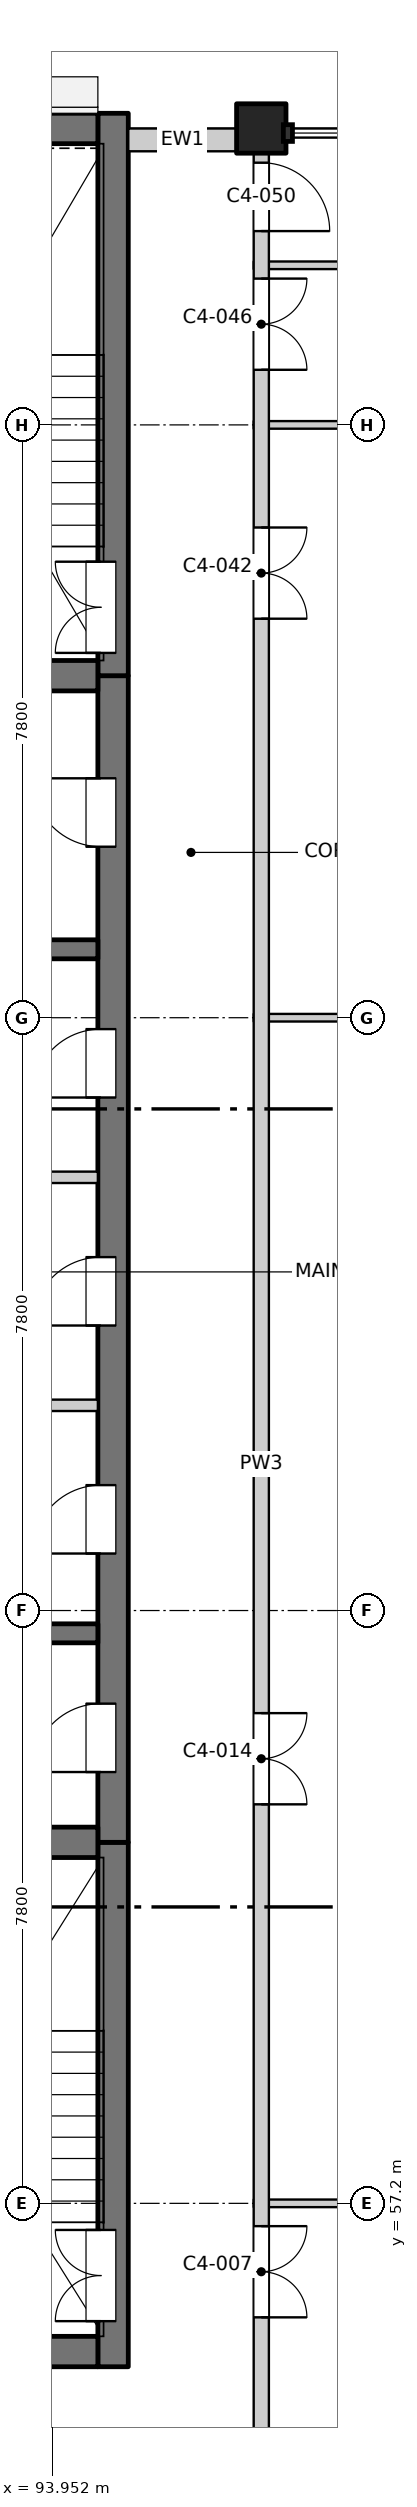
"""IFC4 building model, lengths in metres.
Left out: names, types, materials, properties, quantities, classifications, styles, units other than length and angle.
Written with IfcOpenShell. Run it as: python <this file> out.ifc"""

import sys

from ifc_helpers import new_model, si_unit, direction, frame, frame_2d, origin, origin_2d, place, context, subcontext, project, spatial, rectangle, extrude, element, fill, save


model = new_model("IFC4")
c1 = context("Model", 3, precision=1e-05, world=origin(), true_north=direction((0.0, 1.0)))
c2 = subcontext(c1, "Body", "Model", "MODEL_VIEW")
j1 = project(units=[si_unit("LENGTHUNIT", "METRE"), si_unit("PLANEANGLEUNIT", "RADIAN")], contexts=[c1])
p1 = place(None, origin())
s1 = spatial("IfcSite", under=j1, at=p1, CompositionType="ELEMENT")
p2 = place(p1, origin())
s2 = spatial("IfcBuilding", under=s1, at=p2, CompositionType="ELEMENT")
p3 = place(p2, frame((0.0, 0.0, 256.2)))
s3 = spatial("IfcBuildingStorey", under=s2, at=p3, CompositionType="ELEMENT", Elevation=256.2)
p4 = place(p3, frame((96.7, 84.5, -0.25), z_axis=(0.0, 0.0, 1.0), x_axis=(1.0, 0.0, 0.0)))
e1 = element("IfcColumn", 1, at=p4, inside=s3, PredefinedType="COLUMN", context=c2, shape_type="SweptSolid", body=[
    extrude(rectangle(XDim=0.65, YDim=0.65, at=origin_2d()), origin(), (0.0, 0.0, 1.0), 3.4),
])
p5 = place(p3, frame((94.75, 55.05, -0.25), z_axis=(0.0, 0.0, 1.0), x_axis=(0.0, 1.0, 0.0)))
e2 = element("IfcWall", 2, at=p5, inside=s3, PredefinedType="SOLIDWALL", context=c2, shape_type="SweptSolid", body=[
    extrude(rectangle(XDim=6.9, YDim=0.4, at=frame_2d((3.45, 0.0))), origin(), (0.0, 0.0, 1.0), 3.4),
])
p6 = place(p5, frame((0.6, 0.0, 0.25)))
e3 = element("IfcOpeningElement", 3, at=p6, cuts=e2, PredefinedType="OPENING", context=c2, shape_type="SweptSolid", body=[
    extrude(rectangle(XDim=1.2, YDim=2.1, at=frame_2d((0.6, 1.05))), frame((0.0, 0.21, 0.0), z_axis=(0.0, -1.0, 0.0), x_axis=(1.0, 0.0, 0.0)), (0.0, 0.0, 1.0), 0.42),
])
p7 = place(p3, frame((94.75, 61.95, -0.25), z_axis=(0.0, 0.0, 1.0), x_axis=(0.0, 1.0, 0.0)))
e4 = element("IfcWall", 4, at=p7, inside=s3, PredefinedType="SOLIDWALL", context=c2, shape_type="SweptSolid", body=[
    extrude(rectangle(XDim=15.35, YDim=0.4, at=frame_2d((7.675, 0.0))), origin(), (0.0, 0.0, 1.0), 3.4),
])
p8 = place(p7, frame((0.925, 0.0, 0.25)))
e5 = element("IfcOpeningElement", 5, at=p8, cuts=e4, PredefinedType="OPENING", context=c2, shape_type="SweptSolid", body=[
    extrude(rectangle(XDim=0.9, YDim=2.1, at=frame_2d((0.45, 1.05))), frame((0.0, 0.21, 0.0), z_axis=(0.0, -1.0, 0.0), x_axis=(1.0, 0.0, 0.0)), (0.0, 0.0, 1.0), 0.42),
])
p9 = place(p7, frame((3.8, 0.0, 0.25)))
e6 = element("IfcOpeningElement", 6, at=p9, cuts=e4, PredefinedType="OPENING", context=c2, shape_type="SweptSolid", body=[
    extrude(rectangle(XDim=0.9, YDim=2.1, at=frame_2d((0.45, 1.05))), frame((0.0, 0.21, 0.0), z_axis=(0.0, -1.0, 0.0), x_axis=(1.0, 0.0, 0.0)), (0.0, 0.0, 1.0), 0.42),
])
p10 = place(p7, frame((6.8, 0.0, 0.25)))
e7 = element("IfcOpeningElement", 7, at=p10, cuts=e4, PredefinedType="OPENING", context=c2, shape_type="SweptSolid", body=[
    extrude(rectangle(XDim=0.9, YDim=2.1, at=frame_2d((0.45, 1.05))), frame((0.0, 0.21, 0.0), z_axis=(0.0, -1.0, 0.0), x_axis=(1.0, 0.0, 0.0)), (0.0, 0.0, 1.0), 0.42),
])
p11 = place(p7, frame((9.8, 0.0, 0.25)))
e8 = element("IfcOpeningElement", 8, at=p11, cuts=e4, PredefinedType="OPENING", context=c2, shape_type="SweptSolid", body=[
    extrude(rectangle(XDim=0.9, YDim=2.1, at=frame_2d((0.45, 1.05))), frame((0.0, 0.21, 0.0), z_axis=(0.0, -1.0, 0.0), x_axis=(1.0, 0.0, 0.0)), (0.0, 0.0, 1.0), 0.42),
])
p12 = place(p7, frame((13.1, 0.0, 0.25)))
e9 = element("IfcOpeningElement", 9, at=p12, cuts=e4, PredefinedType="OPENING", context=c2, shape_type="SweptSolid", body=[
    extrude(rectangle(XDim=0.9, YDim=2.1, at=frame_2d((0.45, 1.05))), frame((0.0, 0.21, 0.0), z_axis=(0.0, -1.0, 0.0), x_axis=(1.0, 0.0, 0.0)), (0.0, 0.0, 1.0), 0.42),
])
p13 = place(p3, frame((94.75, 77.3, -0.25), z_axis=(0.0, 0.0, 1.0), x_axis=(0.0, 1.0, 0.0)))
e10 = element("IfcWall", 10, at=p13, inside=s3, PredefinedType="SOLIDWALL", context=c2, shape_type="SweptSolid", body=[
    extrude(rectangle(XDim=7.4, YDim=0.4, at=frame_2d((3.7, 0.0))), origin(), (0.0, 0.0, 1.0), 3.4),
])
p14 = place(p13, frame((0.3, 0.0, 0.25)))
e11 = element("IfcOpeningElement", 11, at=p14, cuts=e10, PredefinedType="OPENING", context=c2, shape_type="SweptSolid", body=[
    extrude(rectangle(XDim=1.2, YDim=2.1, at=frame_2d((0.6, 1.05))), frame((0.0, 0.21, 0.0), z_axis=(0.0, -1.0, 0.0), x_axis=(1.0, 0.0, 0.0)), (0.0, 0.0, 1.0), 0.42),
])
p15 = place(p3, frame((75.45, 55.25, -0.25), z_axis=(0.0, 0.0, 1.0), x_axis=(1.0, 0.0, 0.0)))
e12 = element("IfcWall", 12, at=p15, inside=s3, PredefinedType="SOLIDWALL", context=c2, shape_type="SweptSolid", body=[
    extrude(rectangle(XDim=19.1, YDim=0.4, at=frame_2d((9.55, 0.0))), origin(), (0.0, 0.0, 1.0), 3.4),
])
p16 = place(p15, frame((8.8, 0.0, 0.25)))
e13 = element("IfcOpeningElement", 13, at=p16, cuts=e12, PredefinedType="OPENING", context=c2, shape_type="SweptSolid", body=[
    extrude(rectangle(XDim=1.5, YDim=2.1, at=frame_2d((0.75, 1.05))), frame((0.0, 0.21, 0.0), z_axis=(0.0, -1.0, 0.0), x_axis=(1.0, 0.0, 0.0)), (0.0, 0.0, 1.0), 0.42),
])
p17 = place(p3, frame((75.45, 84.5, -0.25), z_axis=(0.0, 0.0, 1.0), x_axis=(1.0, 0.0, 0.0)))
e14 = element("IfcWall", 14, at=p17, inside=s3, PredefinedType="SOLIDWALL", context=c2, shape_type="SweptSolid", body=[
    extrude(rectangle(XDim=19.1, YDim=0.4, at=frame_2d((9.55, 0.0))), origin(), (0.0, 0.0, 1.0), 3.4),
])
p18 = place(p3, frame((90.675, 61.95, -0.25), z_axis=(0.0, 0.0, 1.0), x_axis=(1.0, 0.0, 0.0)))
e15 = element("IfcWall", 15, at=p18, inside=s3, PredefinedType="SOLIDWALL", context=c2, shape_type="SweptSolid", body=[
    extrude(rectangle(XDim=3.875, YDim=0.4, at=frame_2d((1.938, 0.0))), origin(), (0.0, 0.0, 1.0), 3.4),
])
for number, where, z_axis, x_axis in (
    (16, (90.675, 64.7, -0.25), (0.0, 0.0, 1.0), (1.0, 0.0, 0.0)),
    (17, (90.675, 73.7, -0.25), (0.0, 0.0, 1.0), (1.0, 0.0, 0.0)),
):
    element("IfcWall", number, at=place(p3, frame(where, z_axis=z_axis, x_axis=x_axis)), inside=s3, PredefinedType="SOLIDWALL", context=c2, shape_type="SweptSolid", body=[
        extrude(rectangle(XDim=3.875, YDim=0.25, at=frame_2d((1.938, 0.0))), origin(), (0.0, 0.0, 1.0), 3.4),
    ])
p19 = place(p3, frame((90.675, 77.3, -0.25), z_axis=(0.0, 0.0, 1.0), x_axis=(1.0, 0.0, 0.0)))
e18 = element("IfcWall", 18, at=p19, inside=s3, PredefinedType="SOLIDWALL", context=c2, shape_type="SweptSolid", body=[
    extrude(rectangle(XDim=3.875, YDim=0.4, at=frame_2d((1.938, 0.0))), origin(), (0.0, 0.0, 1.0), 3.4),
])
p20 = place(p3, frame((94.95, 84.35, 0.0), z_axis=(0.0, 0.0, 1.0), x_axis=(1.0, 0.0, 0.0)))
e19 = element("IfcWall", 19, at=p20, inside=s3, PredefinedType="SOLIDWALL", context=c2, shape_type="SweptSolid", body=[
    extrude(rectangle(XDim=1.425, YDim=0.3, at=frame_2d((0.712, 0.0))), origin(), (0.0, 0.0, 1.0), 2.7),
])
p21 = place(p3, frame((96.6, 57.2, 0.0), z_axis=(0.0, 0.0, 1.0), x_axis=(1.0, 0.0, 0.0)))
e20 = element("IfcWall", 20, at=p21, inside=s3, PredefinedType="PARTITIONING", context=c2, shape_type="SweptSolid", body=[
    extrude(rectangle(XDim=7.765, YDim=0.1, at=frame_2d((3.882, 0.0))), origin(), (0.0, 0.0, 1.0), 3.15),
])
for number, where, z_axis, x_axis in (
    (21, (90.675, 67.7, 0.0), (0.0, 0.0, 1.0), (1.0, 0.0, 0.0)),
    (22, (90.675, 70.7, 0.0), (0.0, 0.0, 1.0), (1.0, 0.0, 0.0)),
):
    element("IfcWall", number, at=place(p3, frame(where, z_axis=z_axis, x_axis=x_axis)), inside=s3, PredefinedType="PARTITIONING", context=c2, shape_type="SweptSolid", body=[
        extrude(rectangle(XDim=3.875, YDim=0.15, at=frame_2d((1.938, 0.0))), origin(), (0.0, 0.0, 1.0), 3.15),
    ])
p22 = place(p3, frame((96.6, 72.8, 0.0), z_axis=(0.0, 0.0, 1.0), x_axis=(1.0, 0.0, 0.0)))
e23 = element("IfcWall", 23, at=p22, inside=s3, PredefinedType="PARTITIONING", context=c2, shape_type="SweptSolid", body=[
    extrude(rectangle(XDim=7.765, YDim=0.1, at=frame_2d((3.882, 0.0))), origin(), (0.0, 0.0, 1.0), 3.15),
])
for number, where, z_axis, x_axis in (
    (24, (96.6, 80.6, 0.0), (0.0, 0.0, 1.0), (1.0, 0.0, 0.0)),
    (25, (96.6, 82.7, 0.0), (0.0, 0.0, 1.0), (1.0, 0.0, 0.0)),
):
    element("IfcWall", number, at=place(p3, frame(where, z_axis=z_axis, x_axis=x_axis)), inside=s3, PredefinedType="PARTITIONING", context=c2, shape_type="SweptSolid", body=[
        extrude(rectangle(XDim=6.99, YDim=0.1, at=frame_2d((3.495, 0.0))), origin(), (0.0, 0.0, 1.0), 3.15),
    ])
p23 = place(p3, frame((96.7, 49.5, 0.0), z_axis=(0.0, 0.0, 1.0), x_axis=(0.0, 1.0, 0.0)))
e26 = element("IfcWall", 26, at=p23, inside=s3, PredefinedType="PARTITIONING", context=c2, shape_type="SweptSolid", body=[
    extrude(rectangle(XDim=34.865, YDim=0.2, at=frame_2d((17.433, 0.0))), origin(), (0.0, 0.0, 1.0), 3.15),
])
p24 = place(p23, frame((6.2, 0.0, 0.0)))
e27 = element("IfcOpeningElement", 27, at=p24, cuts=e26, PredefinedType="OPENING", context=c2, shape_type="SweptSolid", body=[
    extrude(rectangle(XDim=1.2, YDim=2.1, at=frame_2d((0.6, 1.05))), frame((0.0, 0.11, 0.0), z_axis=(0.0, -1.0, 0.0), x_axis=(1.0, 0.0, 0.0)), (0.0, 0.0, 1.0), 0.22),
])
p25 = place(p23, frame((12.95, 0.0, 0.0)))
e28 = element("IfcOpeningElement", 28, at=p25, cuts=e26, PredefinedType="OPENING", context=c2, shape_type="SweptSolid", body=[
    extrude(rectangle(XDim=1.2, YDim=2.1, at=frame_2d((0.6, 1.05))), frame((0.0, 0.11, 0.0), z_axis=(0.0, -1.0, 0.0), x_axis=(1.0, 0.0, 0.0)), (0.0, 0.0, 1.0), 0.22),
])
p26 = place(p23, frame((28.55, 0.0, 0.0)))
e29 = element("IfcOpeningElement", 29, at=p26, cuts=e26, PredefinedType="OPENING", context=c2, shape_type="SweptSolid", body=[
    extrude(rectangle(XDim=1.2, YDim=2.1, at=frame_2d((0.6, 1.05))), frame((0.0, 0.11, 0.0), z_axis=(0.0, -1.0, 0.0), x_axis=(1.0, 0.0, 0.0)), (0.0, 0.0, 1.0), 0.22),
])
p27 = place(p23, frame((31.825, 0.0, 0.0)))
e30 = element("IfcOpeningElement", 30, at=p27, cuts=e26, PredefinedType="OPENING", context=c2, shape_type="SweptSolid", body=[
    extrude(rectangle(XDim=1.2, YDim=2.1, at=frame_2d((0.6, 1.05))), frame((0.0, 0.11, 0.0), z_axis=(0.0, -1.0, 0.0), x_axis=(1.0, 0.0, 0.0)), (0.0, 0.0, 1.0), 0.22),
])
p28 = place(p23, frame((33.65, 0.0, 0.0)))
e31 = element("IfcOpeningElement", 31, at=p28, cuts=e26, PredefinedType="OPENING", context=c2, shape_type="SweptSolid", body=[
    extrude(rectangle(XDim=0.9, YDim=2.1, at=frame_2d((0.45, 1.05))), frame((0.0, 0.11, 0.0), z_axis=(0.0, -1.0, 0.0), x_axis=(1.0, 0.0, 0.0)), (0.0, 0.0, 1.0), 0.22),
])
p29 = place(p6, origin())
e32 = element("IfcDoor", 32, at=p29, inside=s3, OperationType="DOUBLE_DOOR_SINGLE_SWING", PredefinedType="DOOR", context=c2, shape_type="SweptSolid", body=[
    extrude(rectangle(XDim=1.2, YDim=2.1, at=frame_2d((0.6, 1.05))), frame((0.0, 0.185, 0.0), z_axis=(0.0, -1.0, 0.0), x_axis=(1.0, 0.0, 0.0)), (0.0, 0.0, 1.0), 0.05),
])
fill(e3, e32)
p30 = place(p24, origin())
e33 = element("IfcDoor", 33, at=p30, inside=s3, OperationType="DOUBLE_DOOR_SINGLE_SWING", PredefinedType="DOOR", context=c2, shape_type="SweptSolid", body=[
    extrude(rectangle(XDim=1.2, YDim=2.1, at=frame_2d((0.6, 1.05))), frame((0.0, 0.025, 0.0), z_axis=(0.0, -1.0, 0.0), x_axis=(1.0, 0.0, 0.0)), (0.0, 0.0, 1.0), 0.05),
])
fill(e27, e33)
p31 = place(p25, origin())
e34 = element("IfcDoor", 34, at=p31, inside=s3, OperationType="DOUBLE_DOOR_SINGLE_SWING", PredefinedType="DOOR", context=c2, shape_type="SweptSolid", body=[
    extrude(rectangle(XDim=1.2, YDim=2.1, at=frame_2d((0.6, 1.05))), frame((0.0, 0.025, 0.0), z_axis=(0.0, -1.0, 0.0), x_axis=(1.0, 0.0, 0.0)), (0.0, 0.0, 1.0), 0.05),
])
fill(e28, e34)
p32 = place(p8, origin())
e35 = element("IfcDoor", 35, at=p32, inside=s3, OperationType="SINGLE_SWING_LEFT", PredefinedType="DOOR", context=c2, shape_type="SweptSolid", body=[
    extrude(rectangle(XDim=0.9, YDim=2.1, at=frame_2d((0.45, 1.05))), frame((0.0, 0.185, 0.0), z_axis=(0.0, -1.0, 0.0), x_axis=(1.0, 0.0, 0.0)), (0.0, 0.0, 1.0), 0.05),
])
fill(e5, e35)
p33 = place(p9, origin())
e36 = element("IfcDoor", 36, at=p33, inside=s3, OperationType="SINGLE_SWING_LEFT", PredefinedType="DOOR", context=c2, shape_type="SweptSolid", body=[
    extrude(rectangle(XDim=0.9, YDim=2.1, at=frame_2d((0.45, 1.05))), frame((0.0, 0.185, 0.0), z_axis=(0.0, -1.0, 0.0), x_axis=(1.0, 0.0, 0.0)), (0.0, 0.0, 1.0), 0.05),
])
fill(e6, e36)
p34 = place(p10, origin())
e37 = element("IfcDoor", 37, at=p34, inside=s3, OperationType="SINGLE_SWING_LEFT", PredefinedType="DOOR", context=c2, shape_type="SweptSolid", body=[
    extrude(rectangle(XDim=0.9, YDim=2.1, at=frame_2d((0.45, 1.05))), frame((0.0, 0.185, 0.0), z_axis=(0.0, -1.0, 0.0), x_axis=(1.0, 0.0, 0.0)), (0.0, 0.0, 1.0), 0.05),
])
fill(e7, e37)
p35 = place(p11, origin())
e38 = element("IfcDoor", 38, at=p35, inside=s3, OperationType="SINGLE_SWING_LEFT", PredefinedType="DOOR", context=c2, shape_type="SweptSolid", body=[
    extrude(rectangle(XDim=0.9, YDim=2.1, at=frame_2d((0.45, 1.05))), frame((0.0, 0.185, 0.0), z_axis=(0.0, -1.0, 0.0), x_axis=(1.0, 0.0, 0.0)), (0.0, 0.0, 1.0), 0.05),
])
fill(e8, e38)
p36 = place(p12, origin())
e39 = element("IfcDoor", 39, at=p36, inside=s3, OperationType="SINGLE_SWING_RIGHT", PredefinedType="DOOR", context=c2, shape_type="SweptSolid", body=[
    extrude(rectangle(XDim=0.9, YDim=2.1, at=frame_2d((0.45, 1.05))), frame((0.0, 0.185, 0.0), z_axis=(0.0, -1.0, 0.0), x_axis=(1.0, 0.0, 0.0)), (0.0, 0.0, 1.0), 0.05),
])
fill(e9, e39)
p37 = place(p14, origin())
e40 = element("IfcDoor", 40, at=p37, inside=s3, OperationType="DOUBLE_DOOR_SINGLE_SWING", PredefinedType="DOOR", context=c2, shape_type="SweptSolid", body=[
    extrude(rectangle(XDim=1.2, YDim=2.1, at=frame_2d((0.6, 1.05))), frame((0.0, 0.185, 0.0), z_axis=(0.0, -1.0, 0.0), x_axis=(1.0, 0.0, 0.0)), (0.0, 0.0, 1.0), 0.05),
])
fill(e11, e40)
p38 = place(p26, origin())
e41 = element("IfcDoor", 41, at=p38, inside=s3, OperationType="DOUBLE_DOOR_SINGLE_SWING", PredefinedType="DOOR", context=c2, shape_type="SweptSolid", body=[
    extrude(rectangle(XDim=1.2, YDim=2.1, at=frame_2d((0.6, 1.05))), frame((0.0, 0.025, 0.0), z_axis=(0.0, -1.0, 0.0), x_axis=(1.0, 0.0, 0.0)), (0.0, 0.0, 1.0), 0.05),
])
fill(e29, e41)
p39 = place(p27, origin())
e42 = element("IfcDoor", 42, at=p39, inside=s3, OperationType="DOUBLE_DOOR_SINGLE_SWING", PredefinedType="DOOR", context=c2, shape_type="SweptSolid", body=[
    extrude(rectangle(XDim=1.2, YDim=2.1, at=frame_2d((0.6, 1.05))), frame((0.0, 0.025, 0.0), z_axis=(0.0, -1.0, 0.0), x_axis=(1.0, 0.0, 0.0)), (0.0, 0.0, 1.0), 0.05),
])
fill(e30, e42)
p40 = place(p28, origin())
e43 = element("IfcDoor", 43, at=p40, inside=s3, OperationType="SINGLE_SWING_RIGHT", PredefinedType="DOOR", context=c2, shape_type="SweptSolid", body=[
    extrude(rectangle(XDim=0.9, YDim=2.1, at=frame_2d((0.45, 1.05))), frame((0.0, 0.025, 0.0), z_axis=(0.0, -1.0, 0.0), x_axis=(1.0, 0.0, 0.0)), (0.0, 0.0, 1.0), 0.05),
])
fill(e31, e43)
save(model, sys.argv[1])
